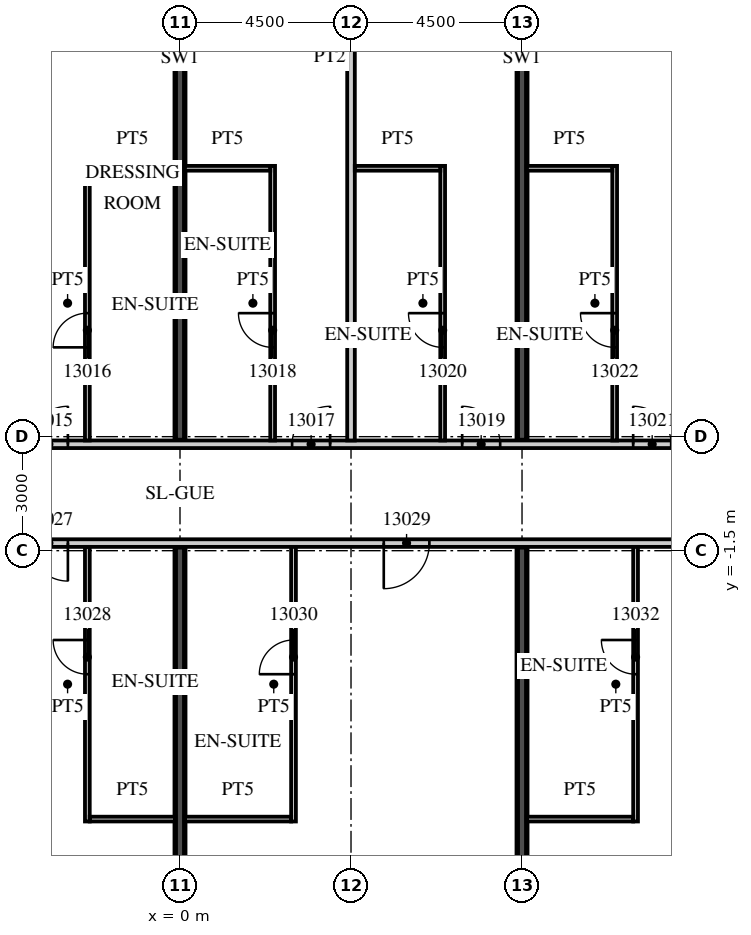
"""IFC4 building model, lengths in metres.
Left out: names, types, materials, properties, quantities, classifications, styles, units other than length and angle.
Written with IfcOpenShell. Run it as: python <this file> out.ifc"""

import sys

from ifc_helpers import new_model, si_unit, direction, frame, frame_2d, origin, place, context, subcontext, project, spatial, rectangle, extrude, element, fill, save


model = new_model("IFC4")
c1 = context("Model", 3, precision=1e-05, world=origin(), true_north=direction((0.0, 1.0)))
c2 = subcontext(c1, "Body", "Model", "MODEL_VIEW")
j1 = project(units=[si_unit("LENGTHUNIT", "METRE"), si_unit("PLANEANGLEUNIT", "RADIAN")], contexts=[c1])
p1 = place(None, origin())
s1 = spatial("IfcSite", under=j1, at=p1, CompositionType="ELEMENT")
p2 = place(p1, origin())
s2 = spatial("IfcBuilding", under=s1, at=p2, CompositionType="ELEMENT")
p3 = place(p2, frame((0.0, 0.0, 73.2)))
s3 = spatial("IfcBuildingStorey", under=s2, at=p3, CompositionType="ELEMENT", Elevation=73.2)
for number, where, z_axis, x_axis in (
    (1, (0.0, -21.54, 0.0), (0.0, 0.0, 1.0), (0.0, 1.0, 0.0)),
    (2, (0.0, 1.4, 0.0), (0.0, 0.0, 1.0), (0.0, 1.0, 0.0)),
    (3, (9.0, -21.54, 0.0), (0.0, 0.0, 1.0), (0.0, 1.0, 0.0)),
    (4, (9.0, 1.4, 0.0), (0.0, 0.0, 1.0), (0.0, 1.0, 0.0)),
):
    element("IfcWall", number, at=place(p3, frame(where, z_axis=z_axis, x_axis=x_axis)), inside=s3, PredefinedType="SHEAR", context=c2, shape_type="SweptSolid", body=[
        extrude(rectangle(XDim=20.14, YDim=0.25, at=frame_2d((10.07, 0.0))), origin(), (0.0, 0.0, 1.0), 3.3),
    ])
p4 = place(p3, frame((-44.55, 1.3, 0.0), z_axis=(0.0, 0.0, 1.0), x_axis=(1.0, 0.0, 0.0)))
e5 = element("IfcWall", 5, at=p4, inside=s3, PredefinedType="PARTITIONING", context=c2, shape_type="SweptSolid", body=[
    extrude(rectangle(XDim=58.05, YDim=0.2, at=frame_2d((29.025, 0.0))), origin(), (0.0, 0.0, 1.0), 3.02),
])
p5 = place(p4, frame((0.525, 0.0, 0.0)))
e6 = element("IfcOpeningElement", 6, at=p5, cuts=e5, PredefinedType="OPENING", context=c2, shape_type="SweptSolid", body=[
    extrude(rectangle(XDim=1.0, YDim=2.1, at=frame_2d((0.5, 1.05))), frame((0.0, 0.11, 0.0), z_axis=(0.0, -1.0, 0.0), x_axis=(1.0, 0.0, 0.0)), (0.0, 0.0, 1.0), 0.22),
])
p6 = place(p4, frame((6.975, 0.0, 0.0)))
e7 = element("IfcOpeningElement", 7, at=p6, cuts=e5, PredefinedType="OPENING", context=c2, shape_type="SweptSolid", body=[
    extrude(rectangle(XDim=1.0, YDim=2.1, at=frame_2d((0.5, 1.05))), frame((0.0, 0.11, 0.0), z_axis=(0.0, -1.0, 0.0), x_axis=(1.0, 0.0, 0.0)), (0.0, 0.0, 1.0), 0.22),
])
p7 = place(p4, frame((9.125, 0.0, 0.0)))
e8 = element("IfcOpeningElement", 8, at=p7, cuts=e5, PredefinedType="OPENING", context=c2, shape_type="SweptSolid", body=[
    extrude(rectangle(XDim=1.0, YDim=2.1, at=frame_2d((0.5, 1.05))), frame((0.0, 0.11, 0.0), z_axis=(0.0, -1.0, 0.0), x_axis=(1.0, 0.0, 0.0)), (0.0, 0.0, 1.0), 0.22),
])
p8 = place(p4, frame((13.6, 0.0, 0.0)))
e9 = element("IfcOpeningElement", 9, at=p8, cuts=e5, PredefinedType="OPENING", context=c2, shape_type="SweptSolid", body=[
    extrude(rectangle(XDim=1.0, YDim=2.1, at=frame_2d((0.5, 1.05))), frame((0.0, 0.11, 0.0), z_axis=(0.0, -1.0, 0.0), x_axis=(1.0, 0.0, 0.0)), (0.0, 0.0, 1.0), 0.22),
])
p9 = place(p4, frame((19.987, 0.0, 0.0)))
e10 = element("IfcOpeningElement", 10, at=p9, cuts=e5, PredefinedType="OPENING", context=c2, shape_type="SweptSolid", body=[
    extrude(rectangle(XDim=1.2, YDim=2.1, at=frame_2d((0.6, 1.05))), frame((0.0, 0.11, 0.0), z_axis=(0.0, -1.0, 0.0), x_axis=(1.0, 0.0, 0.0)), (0.0, 0.0, 1.0), 0.22),
])
p10 = place(p4, frame((31.912, 0.0, 0.0)))
e11 = element("IfcOpeningElement", 11, at=p10, cuts=e5, PredefinedType="OPENING", context=c2, shape_type="SweptSolid", body=[
    extrude(rectangle(XDim=1.2, YDim=2.1, at=frame_2d((0.6, 1.05))), frame((0.0, 0.11, 0.0), z_axis=(0.0, -1.0, 0.0), x_axis=(1.0, 0.0, 0.0)), (0.0, 0.0, 1.0), 0.22),
])
p11 = place(p4, frame((38.5, 0.0, 0.0)))
e12 = element("IfcOpeningElement", 12, at=p11, cuts=e5, PredefinedType="OPENING", context=c2, shape_type="SweptSolid", body=[
    extrude(rectangle(XDim=1.0, YDim=2.1, at=frame_2d((0.5, 1.05))), frame((0.0, 0.11, 0.0), z_axis=(0.0, -1.0, 0.0), x_axis=(1.0, 0.0, 0.0)), (0.0, 0.0, 1.0), 0.22),
])
p12 = place(p4, frame((40.6, 0.0, 0.0)))
e13 = element("IfcOpeningElement", 13, at=p12, cuts=e5, PredefinedType="OPENING", context=c2, shape_type="SweptSolid", body=[
    extrude(rectangle(XDim=1.0, YDim=2.1, at=frame_2d((0.5, 1.05))), frame((0.0, 0.11, 0.0), z_axis=(0.0, -1.0, 0.0), x_axis=(1.0, 0.0, 0.0)), (0.0, 0.0, 1.0), 0.22),
])
p13 = place(p4, frame((47.5, 0.0, 0.0)))
e14 = element("IfcOpeningElement", 14, at=p13, cuts=e5, PredefinedType="OPENING", context=c2, shape_type="SweptSolid", body=[
    extrude(rectangle(XDim=1.0, YDim=2.1, at=frame_2d((0.5, 1.05))), frame((0.0, 0.11, 0.0), z_axis=(0.0, -1.0, 0.0), x_axis=(1.0, 0.0, 0.0)), (0.0, 0.0, 1.0), 0.22),
])
p14 = place(p4, frame((51.975, 0.0, 0.0)))
e15 = element("IfcOpeningElement", 15, at=p14, cuts=e5, PredefinedType="OPENING", context=c2, shape_type="SweptSolid", body=[
    extrude(rectangle(XDim=1.0, YDim=2.1, at=frame_2d((0.5, 1.05))), frame((0.0, 0.11, 0.0), z_axis=(0.0, -1.0, 0.0), x_axis=(1.0, 0.0, 0.0)), (0.0, 0.0, 1.0), 0.22),
])
p15 = place(p4, frame((56.475, 0.0, 0.0)))
e16 = element("IfcOpeningElement", 16, at=p15, cuts=e5, PredefinedType="OPENING", context=c2, shape_type="SweptSolid", body=[
    extrude(rectangle(XDim=1.0, YDim=2.1, at=frame_2d((0.5, 1.05))), frame((0.0, 0.11, 0.0), z_axis=(0.0, -1.0, 0.0), x_axis=(1.0, 0.0, 0.0)), (0.0, 0.0, 1.0), 0.22),
])
p16 = place(p3, frame((-2.438, 1.4, 0.0), z_axis=(0.0, 0.0, 1.0), x_axis=(0.0, 1.0, 0.0)))
e17 = element("IfcWall", 17, at=p16, inside=s3, PredefinedType="PARTITIONING", context=c2, shape_type="SweptSolid", body=[
    extrude(rectangle(XDim=7.225, YDim=0.125, at=frame_2d((3.613, 0.0))), origin(), (0.0, 0.0, 1.0), 3.02),
])
p17 = place(p16, frame((2.45, 0.0, 0.0)))
e18 = element("IfcOpeningElement", 18, at=p17, cuts=e17, PredefinedType="OPENING", context=c2, shape_type="SweptSolid", body=[
    extrude(rectangle(XDim=0.9, YDim=2.1, at=frame_2d((0.45, 1.05))), frame((0.0, 0.073, 0.0), z_axis=(0.0, -1.0, 0.0), x_axis=(1.0, 0.0, 0.0)), (0.0, 0.0, 1.0), 0.145),
])
p18 = place(p3, frame((-2.375, 8.562, 0.0), z_axis=(0.0, 0.0, 1.0), x_axis=(1.0, 0.0, 0.0)))
e19 = element("IfcWall", 19, at=p18, inside=s3, PredefinedType="PARTITIONING", context=c2, shape_type="SweptSolid", body=[
    extrude(rectangle(XDim=2.25, YDim=0.125, at=frame_2d((1.125, 0.0))), origin(), (0.0, 0.0, 1.0), 3.02),
])
p19 = place(p3, frame((4.5, 1.4, 0.0), z_axis=(0.0, 0.0, 1.0), x_axis=(0.0, 1.0, 0.0)))
e20 = element("IfcWall", 20, at=p19, inside=s3, PredefinedType="PARTITIONING", context=c2, shape_type="SweptSolid", body=[
    extrude(rectangle(XDim=20.15, YDim=0.2, at=frame_2d((10.075, 0.0))), origin(), (0.0, 0.0, 1.0), 3.02),
])
p20 = place(p3, frame((2.438, 1.4, 0.0), z_axis=(0.0, 0.0, 1.0), x_axis=(0.0, 1.0, 0.0)))
e21 = element("IfcWall", 21, at=p20, inside=s3, PredefinedType="PARTITIONING", context=c2, shape_type="SweptSolid", body=[
    extrude(rectangle(XDim=7.225, YDim=0.125, at=frame_2d((3.613, 0.0))), origin(), (0.0, 0.0, 1.0), 3.02),
])
p21 = place(p20, frame((2.45, 0.0, 0.0)))
e22 = element("IfcOpeningElement", 22, at=p21, cuts=e21, PredefinedType="OPENING", context=c2, shape_type="SweptSolid", body=[
    extrude(rectangle(XDim=0.9, YDim=2.1, at=frame_2d((0.45, 1.05))), frame((0.0, 0.073, 0.0), z_axis=(0.0, -1.0, 0.0), x_axis=(1.0, 0.0, 0.0)), (0.0, 0.0, 1.0), 0.145),
])
p22 = place(p3, frame((0.125, 8.562, 0.0), z_axis=(0.0, 0.0, 1.0), x_axis=(1.0, 0.0, 0.0)))
e23 = element("IfcWall", 23, at=p22, inside=s3, PredefinedType="PARTITIONING", context=c2, shape_type="SweptSolid", body=[
    extrude(rectangle(XDim=2.25, YDim=0.125, at=frame_2d((1.125, 0.0))), origin(), (0.0, 0.0, 1.0), 3.02),
])
p23 = place(p3, frame((6.912, 1.4, 0.0), z_axis=(0.0, 0.0, 1.0), x_axis=(0.0, 1.0, 0.0)))
e24 = element("IfcWall", 24, at=p23, inside=s3, PredefinedType="PARTITIONING", context=c2, shape_type="SweptSolid", body=[
    extrude(rectangle(XDim=7.225, YDim=0.125, at=frame_2d((3.613, 0.0))), origin(), (0.0, 0.0, 1.0), 3.02),
])
p24 = place(p23, frame((2.45, 0.0, 0.0)))
e25 = element("IfcOpeningElement", 25, at=p24, cuts=e24, PredefinedType="OPENING", context=c2, shape_type="SweptSolid", body=[
    extrude(rectangle(XDim=0.9, YDim=2.1, at=frame_2d((0.45, 1.05))), frame((0.0, 0.073, 0.0), z_axis=(0.0, -1.0, 0.0), x_axis=(1.0, 0.0, 0.0)), (0.0, 0.0, 1.0), 0.145),
])
p25 = place(p3, frame((4.6, 8.562, 0.0), z_axis=(0.0, 0.0, 1.0), x_axis=(1.0, 0.0, 0.0)))
e26 = element("IfcWall", 26, at=p25, inside=s3, PredefinedType="PARTITIONING", context=c2, shape_type="SweptSolid", body=[
    extrude(rectangle(XDim=2.25, YDim=0.125, at=frame_2d((1.125, 0.0))), origin(), (0.0, 0.0, 1.0), 3.02),
])
p26 = place(p3, frame((11.438, 1.4, 0.0), z_axis=(0.0, 0.0, 1.0), x_axis=(0.0, 1.0, 0.0)))
e27 = element("IfcWall", 27, at=p26, inside=s3, PredefinedType="PARTITIONING", context=c2, shape_type="SweptSolid", body=[
    extrude(rectangle(XDim=7.225, YDim=0.125, at=frame_2d((3.613, 0.0))), origin(), (0.0, 0.0, 1.0), 3.02),
])
p27 = place(p26, frame((2.45, 0.0, 0.0)))
e28 = element("IfcOpeningElement", 28, at=p27, cuts=e27, PredefinedType="OPENING", context=c2, shape_type="SweptSolid", body=[
    extrude(rectangle(XDim=0.9, YDim=2.1, at=frame_2d((0.45, 1.05))), frame((0.0, 0.073, 0.0), z_axis=(0.0, -1.0, 0.0), x_axis=(1.0, 0.0, 0.0)), (0.0, 0.0, 1.0), 0.145),
])
p28 = place(p3, frame((9.125, 8.562, 0.0), z_axis=(0.0, 0.0, 1.0), x_axis=(1.0, 0.0, 0.0)))
e29 = element("IfcWall", 29, at=p28, inside=s3, PredefinedType="PARTITIONING", context=c2, shape_type="SweptSolid", body=[
    extrude(rectangle(XDim=2.25, YDim=0.125, at=frame_2d((1.125, 0.0))), origin(), (0.0, 0.0, 1.0), 3.02),
])
p29 = place(p3, frame((-13.5, -1.3, 0.0), z_axis=(0.0, 0.0, 1.0), x_axis=(1.0, 0.0, 0.0)))
e30 = element("IfcWall", 30, at=p29, inside=s3, PredefinedType="PARTITIONING", context=c2, shape_type="SweptSolid", body=[
    extrude(rectangle(XDim=58.05, YDim=0.2, at=frame_2d((29.025, 0.0))), origin(), (0.0, 0.0, 1.0), 3.02),
])
p30 = place(p29, frame((2.925, 0.0, 0.0)))
e31 = element("IfcOpeningElement", 31, at=p30, cuts=e30, PredefinedType="OPENING", context=c2, shape_type="SweptSolid", body=[
    extrude(rectangle(XDim=1.0, YDim=2.1, at=frame_2d((0.5, 1.05))), frame((0.0, 0.11, 0.0), z_axis=(0.0, -1.0, 0.0), x_axis=(1.0, 0.0, 0.0)), (0.0, 0.0, 1.0), 0.22),
])
p31 = place(p29, frame((5.075, 0.0, 0.0)))
e32 = element("IfcOpeningElement", 32, at=p31, cuts=e30, PredefinedType="OPENING", context=c2, shape_type="SweptSolid", body=[
    extrude(rectangle(XDim=1.0, YDim=2.1, at=frame_2d((0.5, 1.05))), frame((0.0, 0.11, 0.0), z_axis=(0.0, -1.0, 0.0), x_axis=(1.0, 0.0, 0.0)), (0.0, 0.0, 1.0), 0.22),
])
p32 = place(p29, frame((9.55, 0.0, 0.0)))
e33 = element("IfcOpeningElement", 33, at=p32, cuts=e30, PredefinedType="OPENING", context=c2, shape_type="SweptSolid", body=[
    extrude(rectangle(XDim=1.0, YDim=2.1, at=frame_2d((0.5, 1.05))), frame((0.0, 0.11, 0.0), z_axis=(0.0, -1.0, 0.0), x_axis=(1.0, 0.0, 0.0)), (0.0, 0.0, 1.0), 0.22),
])
p33 = place(p29, frame((18.862, 0.0, 0.0)))
e34 = element("IfcOpeningElement", 34, at=p33, cuts=e30, PredefinedType="OPENING", context=c2, shape_type="SweptSolid", body=[
    extrude(rectangle(XDim=1.2, YDim=2.1, at=frame_2d((0.6, 1.05))), frame((0.0, 0.11, 0.0), z_axis=(0.0, -1.0, 0.0), x_axis=(1.0, 0.0, 0.0)), (0.0, 0.0, 1.0), 0.22),
])
p34 = place(p29, frame((27.862, 0.0, 0.0)))
e35 = element("IfcOpeningElement", 35, at=p34, cuts=e30, PredefinedType="OPENING", context=c2, shape_type="SweptSolid", body=[
    extrude(rectangle(XDim=1.2, YDim=2.1, at=frame_2d((0.6, 1.05))), frame((0.0, 0.11, 0.0), z_axis=(0.0, -1.0, 0.0), x_axis=(1.0, 0.0, 0.0)), (0.0, 0.0, 1.0), 0.22),
])
p35 = place(p29, frame((34.45, 0.0, 0.0)))
e36 = element("IfcOpeningElement", 36, at=p35, cuts=e30, PredefinedType="OPENING", context=c2, shape_type="SweptSolid", body=[
    extrude(rectangle(XDim=1.0, YDim=2.1, at=frame_2d((0.5, 1.05))), frame((0.0, 0.11, 0.0), z_axis=(0.0, -1.0, 0.0), x_axis=(1.0, 0.0, 0.0)), (0.0, 0.0, 1.0), 0.22),
])
p36 = place(p29, frame((38.925, 0.0, 0.0)))
e37 = element("IfcOpeningElement", 37, at=p36, cuts=e30, PredefinedType="OPENING", context=c2, shape_type="SweptSolid", body=[
    extrude(rectangle(XDim=1.0, YDim=2.1, at=frame_2d((0.5, 1.05))), frame((0.0, 0.11, 0.0), z_axis=(0.0, -1.0, 0.0), x_axis=(1.0, 0.0, 0.0)), (0.0, 0.0, 1.0), 0.22),
])
p37 = place(p29, frame((45.862, 0.0, 0.0)))
e38 = element("IfcOpeningElement", 38, at=p37, cuts=e30, PredefinedType="OPENING", context=c2, shape_type="SweptSolid", body=[
    extrude(rectangle(XDim=1.2, YDim=2.1, at=frame_2d((0.6, 1.05))), frame((0.0, 0.11, 0.0), z_axis=(0.0, -1.0, 0.0), x_axis=(1.0, 0.0, 0.0)), (0.0, 0.0, 1.0), 0.22),
])
p38 = place(p29, frame((50.075, 0.0, 0.0)))
e39 = element("IfcOpeningElement", 39, at=p38, cuts=e30, PredefinedType="OPENING", context=c2, shape_type="SweptSolid", body=[
    extrude(rectangle(XDim=1.0, YDim=2.1, at=frame_2d((0.5, 1.05))), frame((0.0, 0.11, 0.0), z_axis=(0.0, -1.0, 0.0), x_axis=(1.0, 0.0, 0.0)), (0.0, 0.0, 1.0), 0.22),
])
p39 = place(p29, frame((56.525, 0.0, 0.0)))
e40 = element("IfcOpeningElement", 40, at=p39, cuts=e30, PredefinedType="OPENING", context=c2, shape_type="SweptSolid", body=[
    extrude(rectangle(XDim=1.0, YDim=2.1, at=frame_2d((0.5, 1.05))), frame((0.0, 0.11, 0.0), z_axis=(0.0, -1.0, 0.0), x_axis=(1.0, 0.0, 0.0)), (0.0, 0.0, 1.0), 0.22),
])
p40 = place(p3, frame((-2.438, -8.625, 0.0), z_axis=(0.0, 0.0, 1.0), x_axis=(0.0, 1.0, 0.0)))
e41 = element("IfcWall", 41, at=p40, inside=s3, PredefinedType="PARTITIONING", context=c2, shape_type="SweptSolid", body=[
    extrude(rectangle(XDim=7.225, YDim=0.125, at=frame_2d((3.613, 0.0))), origin(), (0.0, 0.0, 1.0), 3.02),
])
p41 = place(p40, frame((3.875, 0.0, 0.0)))
e42 = element("IfcOpeningElement", 42, at=p41, cuts=e41, PredefinedType="OPENING", context=c2, shape_type="SweptSolid", body=[
    extrude(rectangle(XDim=0.9, YDim=2.1, at=frame_2d((0.45, 1.05))), frame((0.0, 0.073, 0.0), z_axis=(0.0, -1.0, 0.0), x_axis=(1.0, 0.0, 0.0)), (0.0, 0.0, 1.0), 0.145),
])
p42 = place(p3, frame((-2.375, -8.562, 0.0), z_axis=(0.0, 0.0, 1.0), x_axis=(1.0, 0.0, 0.0)))
e43 = element("IfcWall", 43, at=p42, inside=s3, PredefinedType="PARTITIONING", context=c2, shape_type="SweptSolid", body=[
    extrude(rectangle(XDim=2.25, YDim=0.125, at=frame_2d((1.125, 0.0))), origin(), (0.0, 0.0, 1.0), 3.02),
])
p43 = place(p3, frame((2.987, -8.625, 0.0), z_axis=(0.0, 0.0, 1.0), x_axis=(0.0, 1.0, 0.0)))
e44 = element("IfcWall", 44, at=p43, inside=s3, PredefinedType="PARTITIONING", context=c2, shape_type="SweptSolid", body=[
    extrude(rectangle(XDim=7.225, YDim=0.125, at=frame_2d((3.613, 0.0))), origin(), (0.0, 0.0, 1.0), 3.02),
])
p44 = place(p43, frame((3.875, 0.0, 0.0)))
e45 = element("IfcOpeningElement", 45, at=p44, cuts=e44, PredefinedType="OPENING", context=c2, shape_type="SweptSolid", body=[
    extrude(rectangle(XDim=0.9, YDim=2.1, at=frame_2d((0.45, 1.05))), frame((0.0, 0.073, 0.0), z_axis=(0.0, -1.0, 0.0), x_axis=(1.0, 0.0, 0.0)), (0.0, 0.0, 1.0), 0.145),
])
p45 = place(p3, frame((0.125, -8.562, 0.0), z_axis=(0.0, 0.0, 1.0), x_axis=(1.0, 0.0, 0.0)))
e46 = element("IfcWall", 46, at=p45, inside=s3, PredefinedType="PARTITIONING", context=c2, shape_type="SweptSolid", body=[
    extrude(rectangle(XDim=2.8, YDim=0.125, at=frame_2d((1.4, 0.0))), origin(), (0.0, 0.0, 1.0), 3.02),
])
p46 = place(p3, frame((11.988, -8.625, 0.0), z_axis=(0.0, 0.0, 1.0), x_axis=(0.0, 1.0, 0.0)))
e47 = element("IfcWall", 47, at=p46, inside=s3, PredefinedType="PARTITIONING", context=c2, shape_type="SweptSolid", body=[
    extrude(rectangle(XDim=7.225, YDim=0.125, at=frame_2d((3.613, 0.0))), origin(), (0.0, 0.0, 1.0), 3.02),
])
p47 = place(p46, frame((3.875, 0.0, 0.0)))
e48 = element("IfcOpeningElement", 48, at=p47, cuts=e47, PredefinedType="OPENING", context=c2, shape_type="SweptSolid", body=[
    extrude(rectangle(XDim=0.9, YDim=2.1, at=frame_2d((0.45, 1.05))), frame((0.0, 0.073, 0.0), z_axis=(0.0, -1.0, 0.0), x_axis=(1.0, 0.0, 0.0)), (0.0, 0.0, 1.0), 0.145),
])
p48 = place(p3, frame((9.125, -8.562, 0.0), z_axis=(0.0, 0.0, 1.0), x_axis=(1.0, 0.0, 0.0)))
e49 = element("IfcWall", 49, at=p48, inside=s3, PredefinedType="PARTITIONING", context=c2, shape_type="SweptSolid", body=[
    extrude(rectangle(XDim=2.8, YDim=0.125, at=frame_2d((1.4, 0.0))), origin(), (0.0, 0.0, 1.0), 3.02),
])
p49 = place(p12, origin())
e50 = element("IfcDoor", 50, at=p49, inside=s3, OperationType="SINGLE_SWING_RIGHT", PredefinedType="DOOR", context=c2, shape_type="SweptSolid", body=[
    extrude(rectangle(XDim=1.0, YDim=2.1, at=frame_2d((0.5, 1.05))), frame((0.0, 0.025, 0.0), z_axis=(0.0, -1.0, 0.0), x_axis=(1.0, 0.0, 0.0)), (0.0, 0.0, 1.0), 0.05),
])
fill(e13, e50)
p50 = place(p17, origin())
e51 = element("IfcDoor", 51, at=p50, inside=s3, OperationType="SINGLE_SWING_LEFT", PredefinedType="DOOR", context=c2, shape_type="SweptSolid", body=[
    extrude(rectangle(XDim=0.9, YDim=2.1, at=frame_2d((0.45, 1.05))), frame((0.0, 0.025, 0.0), z_axis=(0.0, -1.0, 0.0), x_axis=(1.0, 0.0, 0.0)), (0.0, 0.0, 1.0), 0.05),
])
fill(e18, e51)
p51 = place(p13, origin())
e52 = element("IfcDoor", 52, at=p51, inside=s3, OperationType="SINGLE_SWING_RIGHT", PredefinedType="DOOR", context=c2, shape_type="SweptSolid", body=[
    extrude(rectangle(XDim=1.0, YDim=2.1, at=frame_2d((0.5, 1.05))), frame((0.0, 0.025, 0.0), z_axis=(0.0, -1.0, 0.0), x_axis=(1.0, 0.0, 0.0)), (0.0, 0.0, 1.0), 0.05),
])
fill(e14, e52)
p52 = place(p21, origin())
e53 = element("IfcDoor", 53, at=p52, inside=s3, OperationType="SINGLE_SWING_RIGHT", PredefinedType="DOOR", context=c2, shape_type="SweptSolid", body=[
    extrude(rectangle(XDim=0.9, YDim=2.1, at=frame_2d((0.45, 1.05))), frame((0.0, 0.025, 0.0), z_axis=(0.0, -1.0, 0.0), x_axis=(1.0, 0.0, 0.0)), (0.0, 0.0, 1.0), 0.05),
])
fill(e22, e53)
p53 = place(p14, origin())
e54 = element("IfcDoor", 54, at=p53, inside=s3, OperationType="SINGLE_SWING_LEFT", PredefinedType="DOOR", context=c2, shape_type="SweptSolid", body=[
    extrude(rectangle(XDim=1.0, YDim=2.1, at=frame_2d((0.5, 1.05))), frame((0.0, 0.025, 0.0), z_axis=(0.0, -1.0, 0.0), x_axis=(1.0, 0.0, 0.0)), (0.0, 0.0, 1.0), 0.05),
])
fill(e15, e54)
p54 = place(p24, origin())
e55 = element("IfcDoor", 55, at=p54, inside=s3, OperationType="SINGLE_SWING_RIGHT", PredefinedType="DOOR", context=c2, shape_type="SweptSolid", body=[
    extrude(rectangle(XDim=0.9, YDim=2.1, at=frame_2d((0.45, 1.05))), frame((0.0, 0.025, 0.0), z_axis=(0.0, -1.0, 0.0), x_axis=(1.0, 0.0, 0.0)), (0.0, 0.0, 1.0), 0.05),
])
fill(e25, e55)
p55 = place(p15, origin())
e56 = element("IfcDoor", 56, at=p55, inside=s3, OperationType="SINGLE_SWING_LEFT", PredefinedType="DOOR", context=c2, shape_type="SweptSolid", body=[
    extrude(rectangle(XDim=1.0, YDim=2.1, at=frame_2d((0.5, 1.05))), frame((0.0, 0.025, 0.0), z_axis=(0.0, -1.0, 0.0), x_axis=(1.0, 0.0, 0.0)), (0.0, 0.0, 1.0), 0.05),
])
fill(e16, e56)
p56 = place(p27, origin())
e57 = element("IfcDoor", 57, at=p56, inside=s3, OperationType="SINGLE_SWING_RIGHT", PredefinedType="DOOR", context=c2, shape_type="SweptSolid", body=[
    extrude(rectangle(XDim=0.9, YDim=2.1, at=frame_2d((0.45, 1.05))), frame((0.0, 0.025, 0.0), z_axis=(0.0, -1.0, 0.0), x_axis=(1.0, 0.0, 0.0)), (0.0, 0.0, 1.0), 0.05),
])
fill(e28, e57)
p57 = place(p32, origin())
e58 = element("IfcDoor", 58, at=p57, inside=s3, OperationType="SINGLE_SWING_RIGHT", PredefinedType="DOOR", context=c2, shape_type="SweptSolid", body=[
    extrude(rectangle(XDim=1.0, YDim=2.1, at=frame_2d((0.5, 1.05))), frame((0.0, 0.025, 0.0), z_axis=(0.0, -1.0, 0.0), x_axis=(1.0, 0.0, 0.0)), (0.0, 0.0, 1.0), 0.05),
])
fill(e33, e58)
p58 = place(p41, origin())
e59 = element("IfcDoor", 59, at=p58, inside=s3, OperationType="SINGLE_SWING_RIGHT", PredefinedType="DOOR", context=c2, shape_type="SweptSolid", body=[
    extrude(rectangle(XDim=0.9, YDim=2.1, at=frame_2d((0.45, 1.05))), frame((0.0, 0.025, 0.0), z_axis=(0.0, -1.0, 0.0), x_axis=(1.0, 0.0, 0.0)), (0.0, 0.0, 1.0), 0.05),
])
fill(e42, e59)
p59 = place(p33, origin())
e60 = element("IfcDoor", 60, at=p59, inside=s3, OperationType="SINGLE_SWING_LEFT", PredefinedType="DOOR", context=c2, shape_type="SweptSolid", body=[
    extrude(rectangle(XDim=1.2, YDim=2.1, at=frame_2d((0.6, 1.05))), frame((0.0, 0.025, 0.0), z_axis=(0.0, -1.0, 0.0), x_axis=(1.0, 0.0, 0.0)), (0.0, 0.0, 1.0), 0.05),
])
fill(e34, e60)
p60 = place(p44, origin())
e61 = element("IfcDoor", 61, at=p60, inside=s3, OperationType="SINGLE_SWING_LEFT", PredefinedType="DOOR", context=c2, shape_type="SweptSolid", body=[
    extrude(rectangle(XDim=0.9, YDim=2.1, at=frame_2d((0.45, 1.05))), frame((0.0, 0.025, 0.0), z_axis=(0.0, -1.0, 0.0), x_axis=(1.0, 0.0, 0.0)), (0.0, 0.0, 1.0), 0.05),
])
fill(e45, e61)
p61 = place(p47, origin())
e62 = element("IfcDoor", 62, at=p61, inside=s3, OperationType="SINGLE_SWING_RIGHT", PredefinedType="DOOR", context=c2, shape_type="SweptSolid", body=[
    extrude(rectangle(XDim=0.9, YDim=2.1, at=frame_2d((0.45, 1.05))), frame((0.0, 0.025, 0.0), z_axis=(0.0, -1.0, 0.0), x_axis=(1.0, 0.0, 0.0)), (0.0, 0.0, 1.0), 0.05),
])
fill(e48, e62)
save(model, sys.argv[1])
